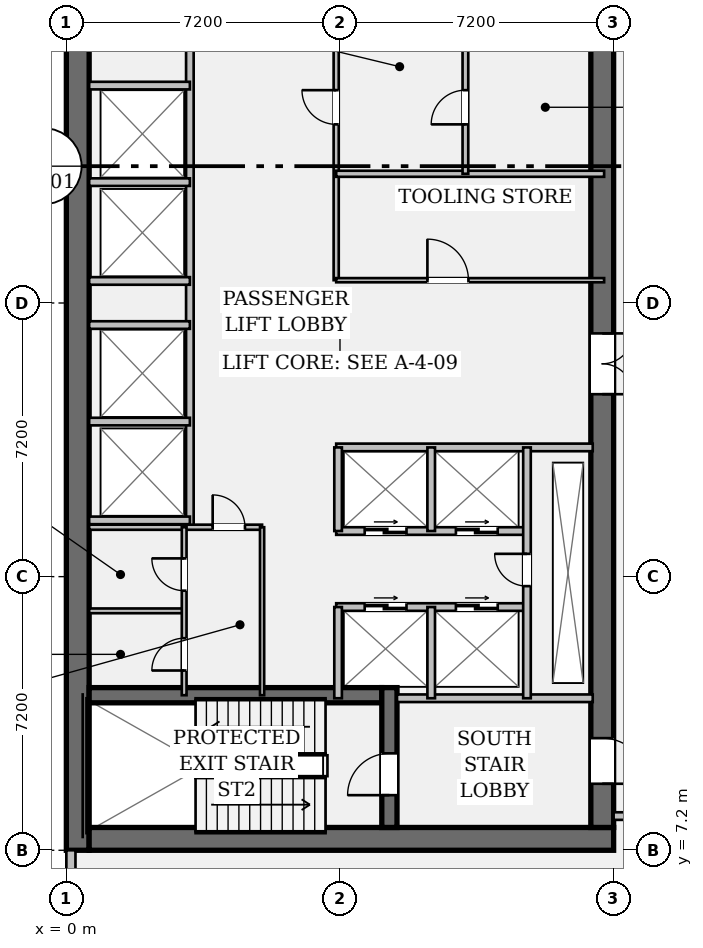
"""IFC4 building model, lengths in metres.
Left out: names, types, materials, properties, quantities, classifications, styles, units other than length and angle.
Written with IfcOpenShell. Run it as: python <this file> out.ifc"""

import sys

from ifc_helpers import new_model, si_unit, direction, frame, frame_2d, origin, place, context, subcontext, project, spatial, rectangle, extrude, element, fill, save


model = new_model("IFC4")
c1 = context("Model", 3, precision=1e-05, world=origin(), true_north=direction((0.0, 1.0)))
c2 = subcontext(c1, "Body", "Model", "MODEL_VIEW")
j1 = project(units=[si_unit("LENGTHUNIT", "METRE"), si_unit("PLANEANGLEUNIT", "RADIAN")], contexts=[c1])
p1 = place(None, origin())
s1 = spatial("IfcSite", under=j1, at=p1, CompositionType="ELEMENT")
p2 = place(p1, origin())
s2 = spatial("IfcBuilding", under=s1, at=p2, CompositionType="ELEMENT")
p3 = place(p2, frame((0.0, 0.0, 163.8)))
s3 = spatial("IfcBuildingStorey", under=s2, at=p3, CompositionType="ELEMENT", Elevation=163.8)
p4 = place(p3, frame((0.3, 7.2, 0.0), z_axis=(0.0, 0.0, 1.0), x_axis=(0.0, 1.0, 0.0)))
e1 = element("IfcWall", 1, at=p4, inside=s3, PredefinedType="SHEAR", context=c2, shape_type="SweptSolid", body=[
    extrude(rectangle(XDim=28.8, YDim=0.6, at=frame_2d((14.4, 0.0))), origin(), (0.0, 0.0, 1.0), 4.6),
])
p5 = place(p3, frame((0.6, 7.5, 0.0), z_axis=(0.0, 0.0, 1.0), x_axis=(1.0, 0.0, 0.0)))
e2 = element("IfcWall", 2, at=p5, inside=s3, PredefinedType="SHEAR", context=c2, shape_type="SweptSolid", body=[
    extrude(rectangle(XDim=13.8, YDim=0.6, at=frame_2d((6.9, 0.0))), origin(), (0.0, 0.0, 1.0), 4.6),
])
p6 = place(p3, frame((14.1, 35.4, 0.0), z_axis=(0.0, 0.0, 1.0), x_axis=(0.0, -1.0, 0.0)))
e3 = element("IfcWall", 3, at=p6, inside=s3, PredefinedType="SHEAR", context=c2, shape_type="SweptSolid", body=[
    extrude(rectangle(XDim=27.6, YDim=0.6, at=frame_2d((13.8, 0.0))), origin(), (0.0, 0.0, 1.0), 4.6),
])
p7 = place(p6, frame((1.3, 0.0, 0.0)))
e4 = element("IfcOpeningElement", 4, at=p7, cuts=e3, PredefinedType="OPENING", context=c2, shape_type="SweptSolid", body=[
    extrude(rectangle(XDim=1.2, YDim=2.15, at=frame_2d((0.6, 1.075))), frame((0.0, 0.312, 0.0), z_axis=(0.0, -1.0, 0.0), x_axis=(1.0, 0.0, 0.0)), (0.0, 0.0, 1.0), 0.624),
])
p8 = place(p6, frame((25.25, 0.0, 0.0)))
e5 = element("IfcOpeningElement", 5, at=p8, cuts=e3, PredefinedType="OPENING", context=c2, shape_type="SweptSolid", body=[
    extrude(rectangle(XDim=1.2, YDim=2.15, at=frame_2d((0.6, 1.075))), frame((0.0, 0.312, 0.0), z_axis=(0.0, -1.0, 0.0), x_axis=(1.0, 0.0, 0.0)), (0.0, 0.0, 1.0), 0.624),
])
p9 = place(p6, frame((14.6, 0.0, 0.0)))
e6 = element("IfcOpeningElement", 6, at=p9, cuts=e3, PredefinedType="OPENING", context=c2, shape_type="SweptSolid", body=[
    extrude(rectangle(XDim=1.6, YDim=2.2, at=frame_2d((0.8, 1.1))), frame((0.0, 0.312, 0.0), z_axis=(0.0, -1.0, 0.0), x_axis=(1.0, 0.0, 0.0)), (0.0, 0.0, 1.0), 0.624),
])
p10 = place(p3, frame((0.6, 11.28, 0.0), z_axis=(0.0, 0.0, 1.0), x_axis=(1.0, 0.0, 0.0)))
e7 = element("IfcWall", 7, at=p10, inside=s3, PredefinedType="SHEAR", context=c2, shape_type="SweptSolid", body=[
    extrude(rectangle(XDim=7.7, YDim=0.4, at=frame_2d((3.85, 0.0))), origin(), (0.0, 0.0, 1.0), 4.6),
])
p11 = place(p3, frame((8.5, 7.8, 0.0), z_axis=(0.0, 0.0, 1.0), x_axis=(0.0, 1.0, 0.0)))
e8 = element("IfcWall", 8, at=p11, inside=s3, PredefinedType="SHEAR", context=c2, shape_type="SweptSolid", body=[
    extrude(rectangle(XDim=3.68, YDim=0.4, at=frame_2d((1.84, 0.0))), origin(), (0.0, 0.0, 1.0), 4.6),
])
p12 = place(p11, frame((0.85, 0.0, 0.0)))
e9 = element("IfcOpeningElement", 9, at=p12, cuts=e8, PredefinedType="OPENING", context=c2, shape_type="SweptSolid", body=[
    extrude(rectangle(XDim=1.1, YDim=2.15, at=frame_2d((0.55, 1.075))), frame((0.0, 0.212, 0.0), z_axis=(0.0, -1.0, 0.0), x_axis=(1.0, 0.0, 0.0)), (0.0, 0.0, 1.0), 0.424),
])
p13 = place(p3, frame((0.12, 6.02, 0.0), z_axis=(0.0, 0.0, 1.0), x_axis=(0.0, 1.0, 0.0)))
e10 = element("IfcWall", 10, at=p13, inside=s3, PredefinedType="STANDARD", context=c2, shape_type="SweptSolid", body=[
    extrude(rectangle(XDim=1.18, YDim=0.24, at=frame_2d((0.59, 0.0))), origin(), (0.0, 0.0, 1.0), 4.6),
])
p14 = place(p3, frame((8.7, 11.2, 0.0), z_axis=(0.0, 0.0, 1.0), x_axis=(1.0, 0.0, 0.0)))
e11 = element("IfcWall", 11, at=p14, inside=s3, PredefinedType="PARTITIONING", context=c2, shape_type="SweptSolid", body=[
    extrude(rectangle(XDim=5.15, YDim=0.2, at=frame_2d((2.575, 0.0))), origin(), (0.0, 0.0, 1.0), 4.6),
])
p15 = place(p3, frame((3.25, 15.7, 0.0), z_axis=(0.0, 0.0, 1.0), x_axis=(0.0, 1.0, 0.0)))
e12 = element("IfcWall", 12, at=p15, inside=s3, PredefinedType="PARTITIONING", context=c2, shape_type="SweptSolid", body=[
    extrude(rectangle(XDim=13.08, YDim=0.2, at=frame_2d((6.54, 0.0))), origin(), (0.0, 0.0, 1.0), 4.6),
])
for number, where, z_axis, x_axis in (
    (13, (0.6, 15.88, 0.0), (0.0, 0.0, 1.0), (1.0, 0.0, 0.0)),
    (14, (0.6, 18.48, 0.0), (0.0, 0.0, 1.0), (1.0, 0.0, 0.0)),
    (15, (0.6, 22.18, 0.0), (0.0, 0.0, 1.0), (1.0, 0.0, 0.0)),
    (16, (0.6, 24.78, 0.0), (0.0, 0.0, 1.0), (1.0, 0.0, 0.0)),
    (17, (0.6, 21.02, 0.0), (0.0, 0.0, 1.0), (1.0, 0.0, 0.0)),
    (18, (0.6, 27.32, 0.0), (0.0, 0.0, 1.0), (1.0, 0.0, 0.0)),
):
    element("IfcWall", number, at=place(p3, frame(where, z_axis=z_axis, x_axis=x_axis)), inside=s3, PredefinedType="PARTITIONING", context=c2, shape_type="SweptSolid", body=[
        extrude(rectangle(XDim=2.65, YDim=0.2, at=frame_2d((1.325, 0.0))), origin(), (0.0, 0.0, 1.0), 4.6),
    ])
p16 = place(p3, frame((7.1, 22.2, 0.0), z_axis=(0.0, 0.0, 1.0), x_axis=(0.0, 1.0, 0.0)))
e19 = element("IfcWall", 19, at=p16, inside=s3, PredefinedType="PARTITIONING", context=c2, shape_type="SweptSolid", body=[
    extrude(rectangle(XDim=6.58, YDim=0.135, at=frame_2d((3.29, 0.0))), origin(), (0.0, 0.0, 1.0), 4.6),
])
p17 = place(p16, frame((4.1, 0.0, 0.0)))
e20 = element("IfcOpeningElement", 20, at=p17, cuts=e19, PredefinedType="OPENING", context=c2, shape_type="SweptSolid", body=[
    extrude(rectangle(XDim=0.9, YDim=2.15, at=frame_2d((0.45, 1.075))), frame((0.0, 0.08, 0.0), z_axis=(0.0, -1.0, 0.0), x_axis=(1.0, 0.0, 0.0)), (0.0, 0.0, 1.0), 0.159),
])
p18 = place(p3, frame((7.1, 22.2, 0.0), z_axis=(0.0, 0.0, 1.0), x_axis=(1.0, 0.0, 0.0)))
e21 = element("IfcWall", 21, at=p18, inside=s3, PredefinedType="PARTITIONING", context=c2, shape_type="SweptSolid", body=[
    extrude(rectangle(XDim=7.05, YDim=0.11, at=frame_2d((3.525, 0.0))), origin(), (0.0, 0.0, 1.0), 4.6),
])
p19 = place(p18, frame((2.4, 0.0, 0.0)))
e22 = element("IfcOpeningElement", 22, at=p19, cuts=e21, PredefinedType="OPENING", context=c2, shape_type="SweptSolid", body=[
    extrude(rectangle(XDim=1.08, YDim=2.15, at=frame_2d((0.54, 1.075))), frame((0.0, 0.067, 0.0), z_axis=(0.0, -1.0, 0.0), x_axis=(1.0, 0.0, 0.0)), (0.0, 0.0, 1.0), 0.134),
])
p20 = place(p3, frame((7.1, 25.0, 0.0), z_axis=(0.0, 0.0, 1.0), x_axis=(1.0, 0.0, 0.0)))
e23 = element("IfcWall", 23, at=p20, inside=s3, PredefinedType="PARTITIONING", context=c2, shape_type="SweptSolid", body=[
    extrude(rectangle(XDim=7.05, YDim=0.16, at=frame_2d((3.525, 0.0))), origin(), (0.0, 0.0, 1.0), 4.6),
])
p21 = place(p3, frame((10.5, 25.0, 0.0), z_axis=(0.0, 0.0, 1.0), x_axis=(0.0, 1.0, 0.0)))
e24 = element("IfcWall", 24, at=p21, inside=s3, PredefinedType="PARTITIONING", context=c2, shape_type="SweptSolid", body=[
    extrude(rectangle(XDim=3.78, YDim=0.15, at=frame_2d((1.89, 0.0))), origin(), (0.0, 0.0, 1.0), 4.6),
])
p22 = place(p21, frame((1.3, 0.0, 0.0)))
e25 = element("IfcOpeningElement", 25, at=p22, cuts=e24, PredefinedType="OPENING", context=c2, shape_type="SweptSolid", body=[
    extrude(rectangle(XDim=0.9, YDim=2.15, at=frame_2d((0.45, 1.075))), frame((0.0, 0.087, 0.0), z_axis=(0.0, -1.0, 0.0), x_axis=(1.0, 0.0, 0.0)), (0.0, 0.0, 1.0), 0.174),
])
p23 = place(p3, frame((7.1, 17.8, 0.0), z_axis=(0.0, 0.0, 1.0), x_axis=(1.0, 0.0, 0.0)))
e26 = element("IfcWall", 26, at=p23, inside=s3, PredefinedType="PARTITIONING", context=c2, shape_type="SweptSolid", body=[
    extrude(rectangle(XDim=6.75, YDim=0.2, at=frame_2d((3.375, 0.0))), origin(), (0.0, 0.0, 1.0), 4.6),
])
p24 = place(p3, frame((7.1, 15.6, 0.0), z_axis=(0.0, 0.0, 1.0), x_axis=(1.0, 0.0, 0.0)))
e27 = element("IfcWall", 27, at=p24, inside=s3, PredefinedType="PARTITIONING", context=c2, shape_type="SweptSolid", body=[
    extrude(rectangle(XDim=5.02, YDim=0.2, at=frame_2d((2.51, 0.0))), origin(), (0.0, 0.0, 1.0), 4.6),
])
p25 = place(p24, frame((0.75, 0.0, 0.0)))
e28 = element("IfcOpeningElement", 28, at=p25, cuts=e27, PredefinedType="OPENING", context=c2, shape_type="SweptSolid", body=[
    extrude(rectangle(XDim=1.1, YDim=2.2, at=frame_2d((0.55, 1.1))), frame((0.0, 0.112, 0.0), z_axis=(0.0, -1.0, 0.0), x_axis=(1.0, 0.0, 0.0)), (0.0, 0.0, 1.0), 0.224),
])
p26 = place(p24, frame((3.15, 0.0, 0.0)))
e29 = element("IfcOpeningElement", 29, at=p26, cuts=e27, PredefinedType="OPENING", context=c2, shape_type="SweptSolid", body=[
    extrude(rectangle(XDim=1.1, YDim=2.2, at=frame_2d((0.55, 1.1))), frame((0.0, 0.112, 0.0), z_axis=(0.0, -1.0, 0.0), x_axis=(1.0, 0.0, 0.0)), (0.0, 0.0, 1.0), 0.224),
])
p27 = place(p3, frame((7.1, 13.6, 0.0), z_axis=(0.0, 0.0, 1.0), x_axis=(1.0, 0.0, 0.0)))
e30 = element("IfcWall", 30, at=p27, inside=s3, PredefinedType="PARTITIONING", context=c2, shape_type="SweptSolid", body=[
    extrude(rectangle(XDim=5.02, YDim=0.2, at=frame_2d((2.51, 0.0))), origin(), (0.0, 0.0, 1.0), 4.6),
])
p28 = place(p27, frame((0.75, 0.0, 0.0)))
e31 = element("IfcOpeningElement", 31, at=p28, cuts=e30, PredefinedType="OPENING", context=c2, shape_type="SweptSolid", body=[
    extrude(rectangle(XDim=1.1, YDim=2.2, at=frame_2d((0.55, 1.1))), frame((0.0, 0.112, 0.0), z_axis=(0.0, -1.0, 0.0), x_axis=(1.0, 0.0, 0.0)), (0.0, 0.0, 1.0), 0.224),
])
p29 = place(p27, frame((3.15, 0.0, 0.0)))
e32 = element("IfcOpeningElement", 32, at=p29, cuts=e30, PredefinedType="OPENING", context=c2, shape_type="SweptSolid", body=[
    extrude(rectangle(XDim=1.1, YDim=2.2, at=frame_2d((0.55, 1.1))), frame((0.0, 0.112, 0.0), z_axis=(0.0, -1.0, 0.0), x_axis=(1.0, 0.0, 0.0)), (0.0, 0.0, 1.0), 0.224),
])
p30 = place(p3, frame((7.15, 15.6, 0.0), z_axis=(0.0, 0.0, 1.0), x_axis=(0.0, 1.0, 0.0)))
e33 = element("IfcWall", 33, at=p30, inside=s3, PredefinedType="PARTITIONING", context=c2, shape_type="SweptSolid", body=[
    extrude(rectangle(XDim=2.2, YDim=0.2, at=frame_2d((1.1, 0.0))), origin(), (0.0, 0.0, 1.0), 4.6),
])
p31 = place(p3, frame((7.15, 11.2, 0.0), z_axis=(0.0, 0.0, 1.0), x_axis=(0.0, 1.0, 0.0)))
e34 = element("IfcWall", 34, at=p31, inside=s3, PredefinedType="PARTITIONING", context=c2, shape_type="SweptSolid", body=[
    extrude(rectangle(XDim=2.4, YDim=0.2, at=frame_2d((1.2, 0.0))), origin(), (0.0, 0.0, 1.0), 4.6),
])
p32 = place(p3, frame((9.6, 15.6, 0.0), z_axis=(0.0, 0.0, 1.0), x_axis=(0.0, 1.0, 0.0)))
e35 = element("IfcWall", 35, at=p32, inside=s3, PredefinedType="PARTITIONING", context=c2, shape_type="SweptSolid", body=[
    extrude(rectangle(XDim=2.2, YDim=0.2, at=frame_2d((1.1, 0.0))), origin(), (0.0, 0.0, 1.0), 4.6),
])
p33 = place(p3, frame((9.6, 11.2, 0.0), z_axis=(0.0, 0.0, 1.0), x_axis=(0.0, 1.0, 0.0)))
e36 = element("IfcWall", 36, at=p33, inside=s3, PredefinedType="PARTITIONING", context=c2, shape_type="SweptSolid", body=[
    extrude(rectangle(XDim=2.4, YDim=0.2, at=frame_2d((1.2, 0.0))), origin(), (0.0, 0.0, 1.0), 4.6),
])
p34 = place(p3, frame((12.12, 11.2, 0.0), z_axis=(0.0, 0.0, 1.0), x_axis=(0.0, 1.0, 0.0)))
e37 = element("IfcWall", 37, at=p34, inside=s3, PredefinedType="PARTITIONING", context=c2, shape_type="SweptSolid", body=[
    extrude(rectangle(XDim=6.6, YDim=0.2, at=frame_2d((3.3, 0.0))), origin(), (0.0, 0.0, 1.0), 4.6),
])
p35 = place(p34, frame((2.95, 0.0, 0.0)))
e38 = element("IfcOpeningElement", 38, at=p35, cuts=e37, PredefinedType="OPENING", context=c2, shape_type="SweptSolid", body=[
    extrude(rectangle(XDim=0.85, YDim=2.15, at=frame_2d((0.425, 1.075))), frame((0.0, 0.112, 0.0), z_axis=(0.0, -1.0, 0.0), x_axis=(1.0, 0.0, 0.0)), (0.0, 0.0, 1.0), 0.224),
])
p36 = place(p3, frame((0.6, 15.7, 0.0), z_axis=(0.0, 0.0, 1.0), x_axis=(1.0, 0.0, 0.0)))
e39 = element("IfcWall", 39, at=p36, inside=s3, PredefinedType="PARTITIONING", context=c2, shape_type="SweptSolid", body=[
    extrude(rectangle(XDim=4.55, YDim=0.135, at=frame_2d((2.275, 0.0))), origin(), (0.0, 0.0, 1.0), 4.6),
])
p37 = place(p36, frame((3.25, 0.0, 0.0)))
e40 = element("IfcOpeningElement", 40, at=p37, cuts=e39, PredefinedType="OPENING", context=c2, shape_type="SweptSolid", body=[
    extrude(rectangle(XDim=0.85, YDim=2.15, at=frame_2d((0.425, 1.075))), frame((0.0, 0.08, 0.0), z_axis=(0.0, -1.0, 0.0), x_axis=(1.0, 0.0, 0.0)), (0.0, 0.0, 1.0), 0.159),
])
p38 = place(p3, frame((5.15, 11.28, 0.0), z_axis=(0.0, 0.0, 1.0), x_axis=(0.0, 1.0, 0.0)))
e41 = element("IfcWall", 41, at=p38, inside=s3, PredefinedType="PARTITIONING", context=c2, shape_type="SweptSolid", body=[
    extrude(rectangle(XDim=4.42, YDim=0.11, at=frame_2d((2.21, 0.0))), origin(), (0.0, 0.0, 1.0), 4.6),
])
p39 = place(p3, frame((0.6, 13.5, 0.0), z_axis=(0.0, 0.0, 1.0), x_axis=(1.0, 0.0, 0.0)))
e42 = element("IfcWall", 42, at=p39, inside=s3, PredefinedType="PARTITIONING", context=c2, shape_type="SweptSolid", body=[
    extrude(rectangle(XDim=2.5, YDim=0.125, at=frame_2d((1.25, 0.0))), origin(), (0.0, 0.0, 1.0), 4.6),
])
p40 = place(p3, frame((3.1, 11.28, 0.0), z_axis=(0.0, 0.0, 1.0), x_axis=(0.0, 1.0, 0.0)))
e43 = element("IfcWall", 43, at=p40, inside=s3, PredefinedType="PARTITIONING", context=c2, shape_type="SweptSolid", body=[
    extrude(rectangle(XDim=4.42, YDim=0.125, at=frame_2d((2.21, 0.0))), origin(), (0.0, 0.0, 1.0), 4.6),
])
p41 = place(p40, frame((0.65, 0.0, 0.0)))
e44 = element("IfcOpeningElement", 44, at=p41, cuts=e43, PredefinedType="OPENING", context=c2, shape_type="SweptSolid", body=[
    extrude(rectangle(XDim=0.85, YDim=2.15, at=frame_2d((0.425, 1.075))), frame((0.0, 0.074, 0.0), z_axis=(0.0, -1.0, 0.0), x_axis=(1.0, 0.0, 0.0)), (0.0, 0.0, 1.0), 0.149),
])
p42 = place(p40, frame((2.75, 0.0, 0.0)))
e45 = element("IfcOpeningElement", 45, at=p42, cuts=e43, PredefinedType="OPENING", context=c2, shape_type="SweptSolid", body=[
    extrude(rectangle(XDim=0.85, YDim=2.15, at=frame_2d((0.425, 1.075))), frame((0.0, 0.074, 0.0), z_axis=(0.0, -1.0, 0.0), x_axis=(1.0, 0.0, 0.0)), (0.0, 0.0, 1.0), 0.149),
])
p43 = place(p3, frame((14.4, 8.1, 0.0), z_axis=(0.0, 0.0, 1.0), x_axis=(1.0, 0.0, 0.0)))
e46 = element("IfcWall", 46, at=p43, inside=s3, PredefinedType="PARTITIONING", context=c2, shape_type="SweptSolid", body=[
    extrude(rectangle(XDim=2.95, YDim=0.2, at=frame_2d((1.475, 0.0))), origin(), (0.0, 0.0, 1.0), 4.168),
])
p44 = place(p43, frame((0.9, 0.0, 0.0)))
e47 = element("IfcOpeningElement", 47, at=p44, cuts=e46, PredefinedType="OPENING", context=c2, shape_type="SweptSolid", body=[
    extrude(rectangle(XDim=1.0, YDim=2.15, at=frame_2d((0.5, 1.075))), frame((0.0, 0.112, 0.0), z_axis=(0.0, -1.0, 0.0), x_axis=(1.0, 0.0, 0.0)), (0.0, 0.0, 1.0), 0.224),
])
p45 = place(p12, origin())
e48 = element("IfcDoor", 48, at=p45, inside=s3, OperationType="SINGLE_SWING_LEFT", PredefinedType="DOOR", context=c2, shape_type="SweptSolid", body=[
    extrude(rectangle(XDim=1.1, YDim=2.15, at=frame_2d((0.55, 1.075))), frame((0.0, 0.025, 0.0), z_axis=(0.0, -1.0, 0.0), x_axis=(1.0, 0.0, 0.0)), (0.0, 0.0, 1.0), 0.05),
])
fill(e9, e48)
p46 = place(p8, origin())
e49 = element("IfcDoor", 49, at=p46, inside=s3, OperationType="SINGLE_SWING_RIGHT", PredefinedType="DOOR", context=c2, shape_type="SweptSolid", body=[
    extrude(rectangle(XDim=1.2, YDim=2.15, at=frame_2d((0.6, 1.075))), frame((0.0, 0.025, 0.0), z_axis=(0.0, -1.0, 0.0), x_axis=(1.0, 0.0, 0.0)), (0.0, 0.0, 1.0), 0.05),
])
fill(e5, e49)
p47 = place(p9, origin())
e50 = element("IfcDoor", 50, at=p47, inside=s3, OperationType="DOUBLE_DOOR_SINGLE_SWING", PredefinedType="DOOR", context=c2, shape_type="SweptSolid", body=[
    extrude(rectangle(XDim=1.6, YDim=2.2, at=frame_2d((0.8, 1.1))), frame((0.0, 0.025, 0.0), z_axis=(0.0, -1.0, 0.0), x_axis=(1.0, 0.0, 0.0)), (0.0, 0.0, 1.0), 0.05),
])
fill(e6, e50)
p48 = place(p19, origin())
e51 = element("IfcDoor", 51, at=p48, inside=s3, OperationType="SINGLE_SWING_LEFT", PredefinedType="DOOR", context=c2, shape_type="SweptSolid", body=[
    extrude(rectangle(XDim=1.08, YDim=2.15, at=frame_2d((0.54, 1.075))), frame((0.0, 0.025, 0.0), z_axis=(0.0, -1.0, 0.0), x_axis=(1.0, 0.0, 0.0)), (0.0, 0.0, 1.0), 0.05),
])
fill(e22, e51)
p49 = place(p17, origin())
e52 = element("IfcDoor", 52, at=p49, inside=s3, OperationType="SINGLE_SWING_RIGHT", PredefinedType="DOOR", context=c2, shape_type="SweptSolid", body=[
    extrude(rectangle(XDim=0.9, YDim=2.15, at=frame_2d((0.45, 1.075))), frame((0.0, 0.025, 0.0), z_axis=(0.0, -1.0, 0.0), x_axis=(1.0, 0.0, 0.0)), (0.0, 0.0, 1.0), 0.05),
])
fill(e20, e52)
p50 = place(p22, origin())
e53 = element("IfcDoor", 53, at=p50, inside=s3, OperationType="SINGLE_SWING_LEFT", PredefinedType="DOOR", context=c2, shape_type="SweptSolid", body=[
    extrude(rectangle(XDim=0.9, YDim=2.15, at=frame_2d((0.45, 1.075))), frame((0.0, 0.025, 0.0), z_axis=(0.0, -1.0, 0.0), x_axis=(1.0, 0.0, 0.0)), (0.0, 0.0, 1.0), 0.05),
])
fill(e25, e53)
p51 = place(p35, origin())
e54 = element("IfcDoor", 54, at=p51, inside=s3, OperationType="SINGLE_SWING_RIGHT", PredefinedType="DOOR", context=c2, shape_type="SweptSolid", body=[
    extrude(rectangle(XDim=0.85, YDim=2.15, at=frame_2d((0.425, 1.075))), frame((0.0, 0.025, 0.0), z_axis=(0.0, -1.0, 0.0), x_axis=(1.0, 0.0, 0.0)), (0.0, 0.0, 1.0), 0.05),
])
fill(e38, e54)
p52 = place(p25, origin())
e55 = element("IfcDoor", 55, at=p52, inside=s3, OperationType="DOUBLE_DOOR_SLIDING", PredefinedType="DOOR", context=c2, shape_type="SweptSolid", body=[
    extrude(rectangle(XDim=1.1, YDim=2.2, at=frame_2d((0.55, 1.1))), frame((0.0, 0.025, 0.0), z_axis=(0.0, -1.0, 0.0), x_axis=(1.0, 0.0, 0.0)), (0.0, 0.0, 1.0), 0.05),
])
fill(e28, e55)
p53 = place(p26, origin())
e56 = element("IfcDoor", 56, at=p53, inside=s3, OperationType="DOUBLE_DOOR_SLIDING", PredefinedType="DOOR", context=c2, shape_type="SweptSolid", body=[
    extrude(rectangle(XDim=1.1, YDim=2.2, at=frame_2d((0.55, 1.1))), frame((0.0, 0.025, 0.0), z_axis=(0.0, -1.0, 0.0), x_axis=(1.0, 0.0, 0.0)), (0.0, 0.0, 1.0), 0.05),
])
fill(e29, e56)
p54 = place(p28, origin())
e57 = element("IfcDoor", 57, at=p54, inside=s3, OperationType="DOUBLE_DOOR_SLIDING", PredefinedType="DOOR", context=c2, shape_type="SweptSolid", body=[
    extrude(rectangle(XDim=1.1, YDim=2.2, at=frame_2d((0.55, 1.1))), frame((0.0, 0.025, 0.0), z_axis=(0.0, -1.0, 0.0), x_axis=(1.0, 0.0, 0.0)), (0.0, 0.0, 1.0), 0.05),
])
fill(e31, e57)
p55 = place(p29, origin())
e58 = element("IfcDoor", 58, at=p55, inside=s3, OperationType="DOUBLE_DOOR_SLIDING", PredefinedType="DOOR", context=c2, shape_type="SweptSolid", body=[
    extrude(rectangle(XDim=1.1, YDim=2.2, at=frame_2d((0.55, 1.1))), frame((0.0, 0.025, 0.0), z_axis=(0.0, -1.0, 0.0), x_axis=(1.0, 0.0, 0.0)), (0.0, 0.0, 1.0), 0.05),
])
fill(e32, e58)
p56 = place(p37, origin())
e59 = element("IfcDoor", 59, at=p56, inside=s3, OperationType="SINGLE_SWING_LEFT", PredefinedType="DOOR", context=c2, shape_type="SweptSolid", body=[
    extrude(rectangle(XDim=0.85, YDim=2.15, at=frame_2d((0.425, 1.075))), frame((0.0, 0.025, 0.0), z_axis=(0.0, -1.0, 0.0), x_axis=(1.0, 0.0, 0.0)), (0.0, 0.0, 1.0), 0.05),
])
fill(e40, e59)
p57 = place(p41, origin())
e60 = element("IfcDoor", 60, at=p57, inside=s3, OperationType="SINGLE_SWING_LEFT", PredefinedType="DOOR", context=c2, shape_type="SweptSolid", body=[
    extrude(rectangle(XDim=0.85, YDim=2.15, at=frame_2d((0.425, 1.075))), frame((0.0, 0.025, 0.0), z_axis=(0.0, -1.0, 0.0), x_axis=(1.0, 0.0, 0.0)), (0.0, 0.0, 1.0), 0.05),
])
fill(e44, e60)
p58 = place(p42, origin())
e61 = element("IfcDoor", 61, at=p58, inside=s3, OperationType="SINGLE_SWING_RIGHT", PredefinedType="DOOR", context=c2, shape_type="SweptSolid", body=[
    extrude(rectangle(XDim=0.85, YDim=2.15, at=frame_2d((0.425, 1.075))), frame((0.0, 0.025, 0.0), z_axis=(0.0, -1.0, 0.0), x_axis=(1.0, 0.0, 0.0)), (0.0, 0.0, 1.0), 0.05),
])
fill(e45, e61)
save(model, sys.argv[1])
